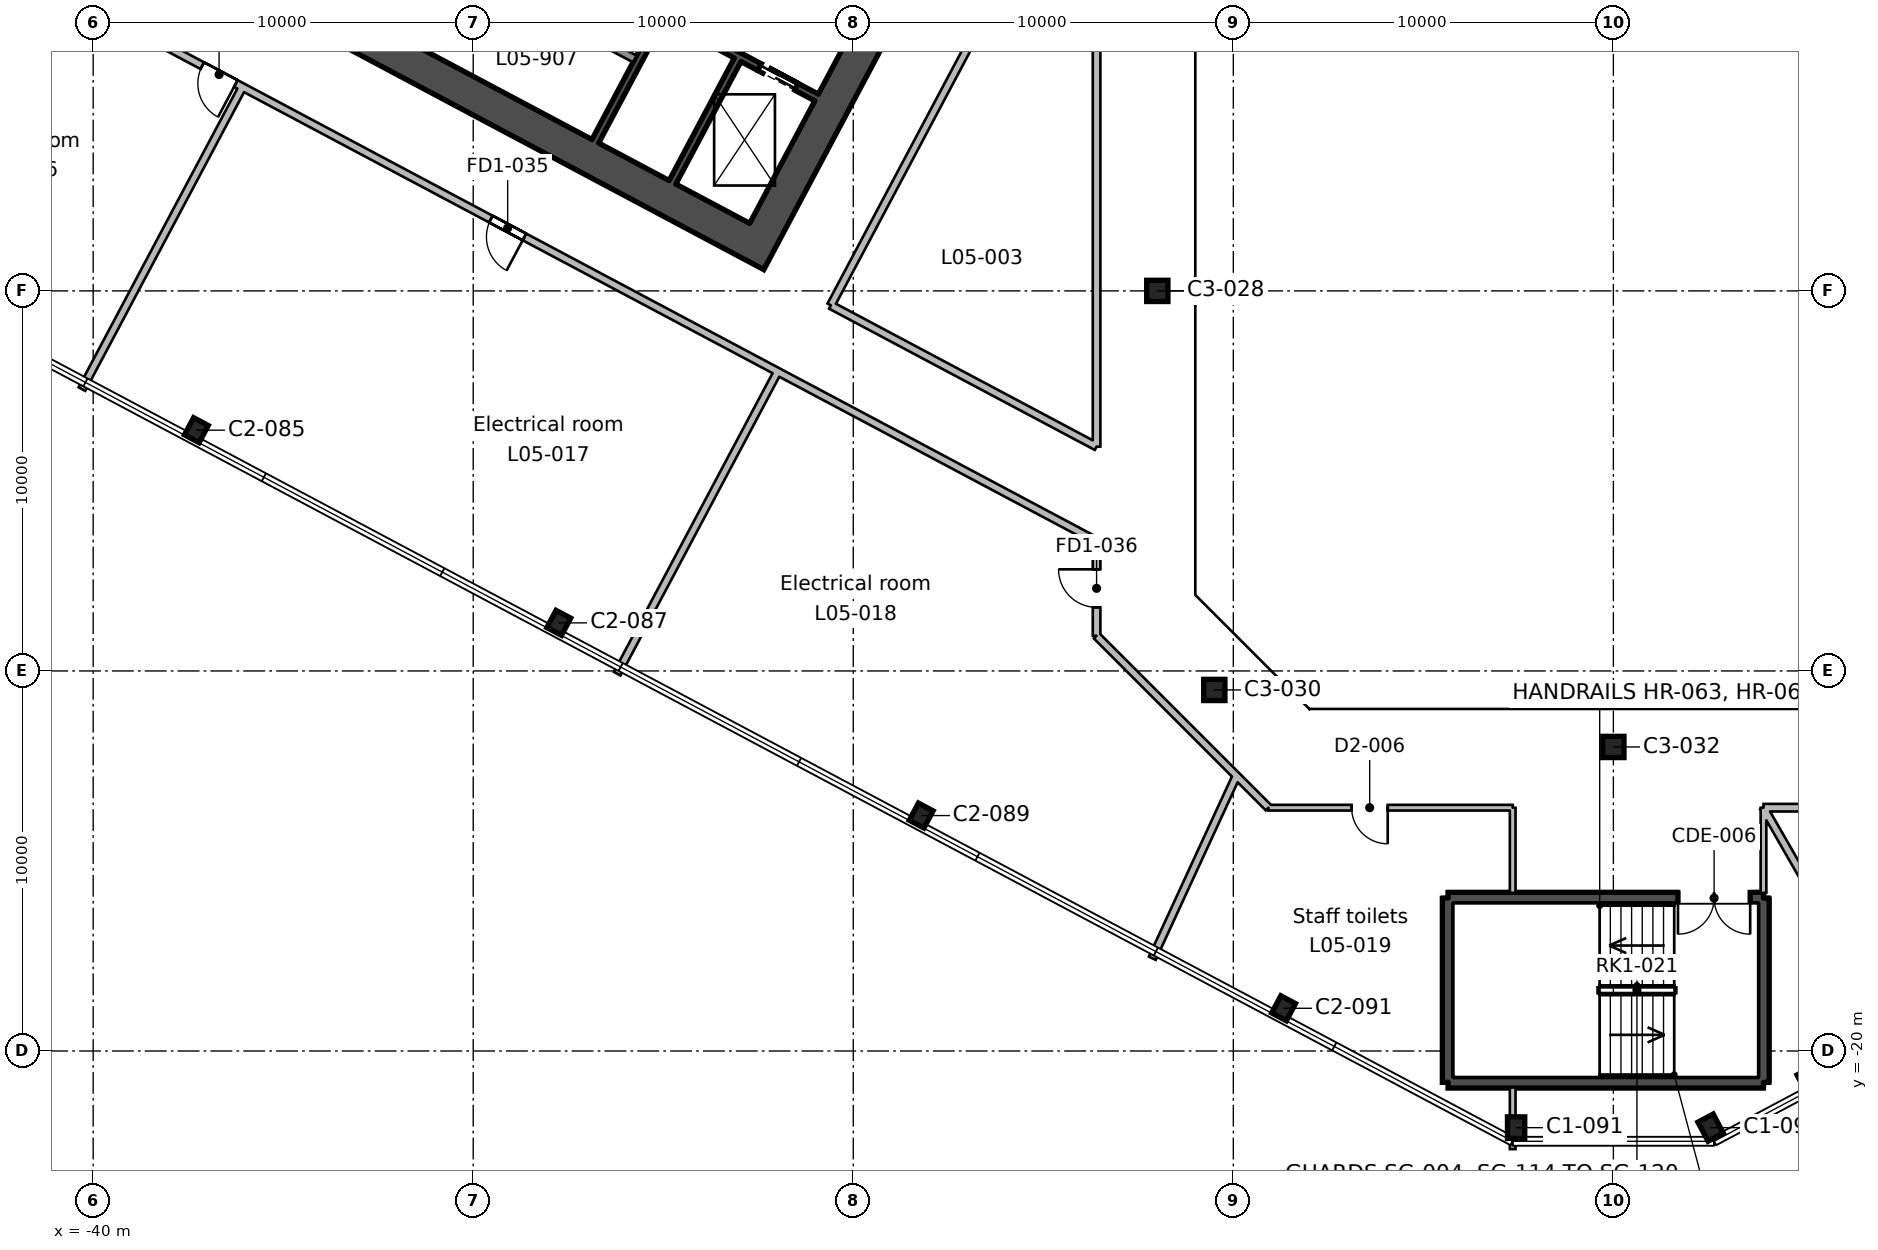
"""IFC4 building model, lengths in metres.
Left out: names, types, materials, properties, quantities, classifications, styles, units other than length and angle.
Written with IfcOpenShell. Run it as: python <this file> out.ifc"""

import sys

from ifc_helpers import new_model, si_unit, direction, frame, frame_2d, origin, origin_2d, place, context, subcontext, project, spatial, rectangle, hollow_rectangle, i_section, extrude, element, fill, save


model = new_model("IFC4")
c1 = context("Model", 3, precision=1e-05, world=origin(), true_north=direction((0.0, 1.0)))
c2 = subcontext(c1, "Body", "Model", "MODEL_VIEW")
j1 = project(units=[si_unit("LENGTHUNIT", "METRE"), si_unit("PLANEANGLEUNIT", "RADIAN")], contexts=[c1])
p1 = place(None, origin())
s1 = spatial("IfcSite", under=j1, at=p1, CompositionType="ELEMENT")
p2 = place(p1, origin())
s2 = spatial("IfcBuilding", under=s1, at=p2, CompositionType="ELEMENT")
p3 = place(p2, frame((0.0, 0.0, 28.4)))
s3 = spatial("IfcBuildingStorey", under=s2, at=p3, CompositionType="ELEMENT", Elevation=28.4)
for number, where, z_axis, x_axis in (
    (1, (-2.559, -22.017, 0.0), (0.0, 0.0, 1.0), (1.0, 0.0, 0.0)),
    (2, (2.559, -22.017, 0.0), (0.0, 0.0, 1.0), (0.883, 0.469, 0.0)),
):
    element("IfcColumn", number, at=place(p3, frame(where, z_axis=z_axis, x_axis=x_axis)), inside=s3, PredefinedType="COLUMN", context=c2, shape_type="SweptSolid", body=[
        extrude(i_section(OverallWidth=0.455, OverallDepth=0.569, WebThickness=0.078, FlangeThickness=0.125, FilletRadius=0.015, at=origin_2d()), origin(), (0.0, 0.0, 1.0), 5.4),
    ])
for number, where, z_axis, x_axis in (
    (3, (5.146, -20.754, 0.0), (0.0, 0.0, 1.0), (0.883, 0.469, 0.0)),
    (4, (-8.677, -18.876, 0.0), (0.0, 0.0, 1.0), (0.883, -0.469, 0.0)),
    (5, (-18.213, -13.805, 0.0), (0.0, 0.0, 1.0), (0.883, -0.469, 0.0)),
):
    element("IfcColumn", number, at=place(p3, frame(where, z_axis=z_axis, x_axis=x_axis)), inside=s3, PredefinedType="COLUMN", context=c2, shape_type="SweptSolid", body=[
        extrude(i_section(OverallWidth=0.437, OverallDepth=0.513, WebThickness=0.061, FlangeThickness=0.097, FilletRadius=0.015, at=origin_2d()), origin(), (0.0, 0.0, 1.0), 5.4),
    ])
for number, where, z_axis, x_axis in (
    (6, (0.0, -12.0, 0.0), (0.0, 0.0, 1.0), (1.0, 0.0, 0.0)),
    (7, (-10.5, -10.5, 0.0), (0.0, 0.0, 1.0), (1.0, 0.0, 0.0)),
):
    element("IfcColumn", number, at=place(p3, frame(where, z_axis=z_axis, x_axis=x_axis)), inside=s3, PredefinedType="COLUMN", context=c2, shape_type="SweptSolid", body=[
        extrude(hollow_rectangle(XDim=0.559, YDim=0.559, WallThickness=0.024, InnerFilletRadius=0.012, OuterFilletRadius=0.035, at=origin_2d()), origin(), (0.0, 0.0, 1.0), 5.4),
    ])
for number, where, z_axis, x_axis in (
    (8, (-27.749, -8.735, 0.0), (0.0, 0.0, 1.0), (0.883, -0.469, 0.0)),
    (9, (-37.285, -3.665, 0.0), (0.0, 0.0, 1.0), (0.883, -0.469, 0.0)),
):
    element("IfcColumn", number, at=place(p3, frame(where, z_axis=z_axis, x_axis=x_axis)), inside=s3, PredefinedType="COLUMN", context=c2, shape_type="SweptSolid", body=[
        extrude(i_section(OverallWidth=0.437, OverallDepth=0.513, WebThickness=0.061, FlangeThickness=0.097, FilletRadius=0.015, at=origin_2d()), origin(), (0.0, 0.0, 1.0), 5.4),
    ])
p4 = place(p3, frame((-12.0, 0.0, 0.0), z_axis=(0.0, 0.0, 1.0), x_axis=(1.0, 0.0, 0.0)))
e10 = element("IfcColumn", 10, at=p4, inside=s3, PredefinedType="COLUMN", context=c2, shape_type="SweptSolid", body=[
    extrude(hollow_rectangle(XDim=0.559, YDim=0.559, WallThickness=0.024, InnerFilletRadius=0.012, OuterFilletRadius=0.035, at=origin_2d()), origin(), (0.0, 0.0, 1.0), 5.4),
])
p5 = place(p3, frame((-13.362, 18.43, 0.0), z_axis=(0.0, 0.0, 1.0), x_axis=(-0.46947084998, -0.882947971864, 0.0)))
e11 = element("IfcWall", 11, at=p5, inside=s3, PredefinedType="SHEAR", context=c2, shape_type="SweptSolid", body=[
    extrude(rectangle(XDim=20.0, YDim=0.9, at=frame_2d((10.0, 0.0))), origin(), (0.0, 0.0, 1.0), 5.4),
])
p6 = place(p5, frame((7.0, 0.0, 0.0)))
e12 = element("IfcOpeningElement", 12, at=p6, cuts=e11, PredefinedType="OPENING", context=c2, shape_type="SweptSolid", body=[
    extrude(rectangle(XDim=2.4, YDim=2.4, at=frame_2d((1.2, 1.2))), frame((0.0, 0.46, 0.0), z_axis=(0.0, -1.0, 0.0), x_axis=(1.0, 0.0, 0.0)), (0.0, 0.0, 1.0), 0.92),
])
p7 = place(p3, frame((-22.937, 1.38, 0.0), z_axis=(0.0, 0.0, 1.0), x_axis=(-0.88295276571, 0.46946183394, 0.0)))
e13 = element("IfcWall", 13, at=p7, inside=s3, PredefinedType="SHEAR", context=c2, shape_type="SweptSolid", body=[
    extrude(rectangle(XDim=20.2, YDim=0.9, at=frame_2d((10.1, 0.0))), origin(), (0.0, 0.0, 1.0), 5.4),
])
p8 = place(p3, frame((-23.043, 6.08, 0.0), z_axis=(0.0, 0.0, 1.0), x_axis=(-0.469494272526, -0.882935517501, 0.0)))
e14 = element("IfcWall", 14, at=p8, inside=s3, PredefinedType="SHEAR", context=c2, shape_type="SweptSolid", body=[
    extrude(rectangle(XDim=3.65, YDim=0.2, at=frame_2d((1.825, 0.0))), origin(), (0.0, 0.0, 1.0), 5.4),
])
p9 = place(p3, frame((-23.36, 10.382, 0.0), z_axis=(0.0, 0.0, 1.0), x_axis=(-0.469480409012, -0.88294288918, 0.0)))
e15 = element("IfcWall", 15, at=p9, inside=s3, PredefinedType="SHEAR", context=c2, shape_type="SweptSolid", body=[
    extrude(rectangle(XDim=7.3, YDim=0.2, at=frame_2d((3.65, 0.0))), origin(), (0.0, 0.0, 1.0), 5.4),
])
p10 = place(p3, frame((-20.965, 5.088, 0.0), z_axis=(0.0, 0.0, 1.0), x_axis=(-0.882925986334, 0.469512196493, 0.0)))
e16 = element("IfcWall", 16, at=p10, inside=s3, PredefinedType="SHEAR", context=c2, shape_type="SweptSolid", body=[
    extrude(rectangle(XDim=4.5, YDim=0.2, at=frame_2d((2.25, 0.0))), origin(), (0.0, 0.0, 1.0), 5.4),
])
p11 = place(p10, frame((0.6, 0.0, 0.0)))
e17 = element("IfcOpeningElement", 17, at=p11, cuts=e16, PredefinedType="OPENING", context=c2, shape_type="SweptSolid", body=[
    extrude(rectangle(XDim=1.1, YDim=2.1, at=frame_2d((0.55, 1.05))), frame((0.0, 0.11, 0.0), z_axis=(0.0, -1.0, 0.0), x_axis=(1.0, 0.0, 0.0)), (0.0, 0.0, 1.0), 0.22),
])
p12 = place(p3, frame((-25.749, 6.103, 0.0), z_axis=(0.0, 0.0, 1.0), x_axis=(-0.882953967957, 0.469459572775, 0.0)))
e18 = element("IfcWall", 18, at=p12, inside=s3, PredefinedType="SOLIDWALL", context=c2, shape_type="SweptSolid", body=[
    extrude(rectangle(XDim=5.2, YDim=0.2, at=frame_2d((2.6, 0.0))), origin(), (0.0, 0.0, 1.0), 5.4),
])
p13 = place(p3, frame((3.95, -15.975, 0.0), z_axis=(0.0, 0.0, 1.0), x_axis=(0.0, -1.0, 0.0)))
e19 = element("IfcWall", 19, at=p13, inside=s3, PredefinedType="SHEAR", context=c2, shape_type="SweptSolid", body=[
    extrude(rectangle(XDim=4.85, YDim=0.3, at=frame_2d((2.425, 0.0))), origin(), (0.0, 0.0, 1.0), 5.4),
])
p14 = place(p3, frame((3.95, -20.825, 0.0), z_axis=(0.0, 0.0, 1.0), x_axis=(-1.0, 0.0, 0.0)))
e20 = element("IfcWall", 20, at=p14, inside=s3, PredefinedType="SHEAR", context=c2, shape_type="SweptSolid", body=[
    extrude(rectangle(XDim=8.3, YDim=0.3, at=frame_2d((4.15, 0.0))), origin(), (0.0, 0.0, 1.0), 5.4),
])
p15 = place(p3, frame((-4.35, -20.825, 0.0), z_axis=(0.0, 0.0, 1.0), x_axis=(0.0, 1.0, 0.0)))
e21 = element("IfcWall", 21, at=p15, inside=s3, PredefinedType="SHEAR", context=c2, shape_type="SweptSolid", body=[
    extrude(rectangle(XDim=4.85, YDim=0.3, at=frame_2d((2.425, 0.0))), origin(), (0.0, 0.0, 1.0), 5.4),
])
p16 = place(p3, frame((-4.35, -15.975, 0.0), z_axis=(0.0, 0.0, 1.0), x_axis=(1.0, 0.0, 0.0)))
e22 = element("IfcWall", 22, at=p16, inside=s3, PredefinedType="SHEAR", context=c2, shape_type="SweptSolid", body=[
    extrude(rectangle(XDim=8.3, YDim=0.3, at=frame_2d((4.15, 0.0))), origin(), (0.0, 0.0, 1.0), 5.4),
])
p17 = place(p16, frame((6.05, 0.0, 0.0)))
e23 = element("IfcOpeningElement", 23, at=p17, cuts=e22, PredefinedType="OPENING", context=c2, shape_type="SweptSolid", body=[
    extrude(rectangle(XDim=1.9, YDim=2.1, at=frame_2d((0.95, 1.05))), frame((0.0, 0.16, 0.0), z_axis=(0.0, -1.0, 0.0), x_axis=(1.0, 0.0, 0.0)), (0.0, 0.0, 1.0), 0.32),
])
p18 = place(p3, frame((-36.071, 5.364, 0.0), z_axis=(0.0, 0.0, 1.0), x_axis=(-0.469475779988, -0.88294535052, 0.0)))
e24 = element("IfcWall", 24, at=p18, inside=s3, PredefinedType="PARTITIONING", context=c2, shape_type="SweptSolid", body=[
    extrude(rectangle(XDim=9.002, YDim=0.2, at=frame_2d((4.501, 0.0))), origin(), (0.0, 0.0, 1.0), 4.95),
])
p19 = place(p3, frame((-13.598, -6.585, 0.0), z_axis=(0.0, 0.0, 1.0), x_axis=(-0.882949042681, 0.469468836057, 0.0)))
e25 = element("IfcWall", 25, at=p19, inside=s3, PredefinedType="PARTITIONING", context=c2, shape_type="SweptSolid", body=[
    extrude(rectangle(XDim=35.059, YDim=0.2, at=frame_2d((17.529, 0.0))), origin(), (0.0, 0.0, 1.0), 4.95),
])
p20 = place(p19, frame((25.65, 0.0, 0.0)))
e26 = element("IfcOpeningElement", 26, at=p20, cuts=e25, PredefinedType="OPENING", context=c2, shape_type="SweptSolid", body=[
    extrude(rectangle(XDim=1.0, YDim=2.1, at=frame_2d((0.5, 1.05))), frame((0.0, 0.11, 0.0), z_axis=(0.0, -1.0, 0.0), x_axis=(1.0, 0.0, 0.0)), (0.0, 0.0, 1.0), 0.22),
])
p21 = place(p19, frame((17.05, 0.0, 0.0)))
e27 = element("IfcOpeningElement", 27, at=p21, cuts=e25, PredefinedType="OPENING", context=c2, shape_type="SweptSolid", body=[
    extrude(rectangle(XDim=1.0, YDim=2.1, at=frame_2d((0.5, 1.05))), frame((0.0, 0.11, 0.0), z_axis=(0.0, -1.0, 0.0), x_axis=(1.0, 0.0, 0.0)), (0.0, 0.0, 1.0), 0.22),
])
p22 = place(p3, frame((-21.988, -2.124, 0.0), z_axis=(0.0, 0.0, 1.0), x_axis=(-0.469475779988, -0.88294535052, 0.0)))
e28 = element("IfcWall", 28, at=p22, inside=s3, PredefinedType="PARTITIONING", context=c2, shape_type="SweptSolid", body=[
    extrude(rectangle(XDim=9.002, YDim=0.2, at=frame_2d((4.501, 0.0))), origin(), (0.0, 0.0, 1.0), 4.95),
])
p23 = place(p3, frame((-9.917, -12.757, 0.0), z_axis=(0.0, 0.0, 1.0), x_axis=(-0.707083331725, 0.70713022987, 0.0)))
e29 = element("IfcWall", 29, at=p23, inside=s3, PredefinedType="PARTITIONING", context=c2, shape_type="SweptSolid", body=[
    extrude(rectangle(XDim=5.206, YDim=0.2, at=frame_2d((2.603, 0.0))), origin(), (0.0, 0.0, 1.0), 4.95),
])
p24 = place(p3, frame((-13.598, -9.076, 0.0), z_axis=(0.0, 0.0, 1.0), x_axis=(0.0, 1.0, 0.0)))
e30 = element("IfcWall", 30, at=p24, inside=s3, PredefinedType="PARTITIONING", context=c2, shape_type="SweptSolid", body=[
    extrude(rectangle(XDim=2.474, YDim=0.2, at=frame_2d((1.237, 0.0))), origin(), (0.0, 0.0, 1.0), 4.95),
])
p25 = place(p24, frame((0.75, 0.0, 0.0)))
e31 = element("IfcOpeningElement", 31, at=p25, cuts=e30, PredefinedType="OPENING", context=c2, shape_type="SweptSolid", body=[
    extrude(rectangle(XDim=1.0, YDim=2.1, at=frame_2d((0.5, 1.05))), frame((0.0, 0.11, 0.0), z_axis=(0.0, -1.0, 0.0), x_axis=(1.0, 0.0, 0.0)), (0.0, 0.0, 1.0), 0.22),
])
p26 = place(p3, frame((-9.917, -12.757, 0.0), z_axis=(0.0, 0.0, 1.0), x_axis=(-0.418797645162, -0.908079584842, 0.0)))
e32 = element("IfcWall", 32, at=p26, inside=s3, PredefinedType="PARTITIONING", context=c2, shape_type="SweptSolid", body=[
    extrude(rectangle(XDim=5.289, YDim=0.2, at=frame_2d((2.645, 0.0))), origin(), (0.0, 0.0, 1.0), 4.95),
])
p27 = place(p3, frame((-3.887, -13.598, 0.0), z_axis=(0.0, 0.0, 1.0), x_axis=(-1.0, 0.0, 0.0)))
e33 = element("IfcWall", 33, at=p27, inside=s3, PredefinedType="PARTITIONING", context=c2, shape_type="SweptSolid", body=[
    extrude(rectangle(XDim=5.189, YDim=0.15, at=frame_2d((2.594, 0.0))), origin(), (0.0, 0.0, 1.0), 4.95),
])
p28 = place(p27, frame((2.05, 0.0, 0.0)))
e34 = element("IfcOpeningElement", 34, at=p28, cuts=e33, PredefinedType="OPENING", context=c2, shape_type="SweptSolid", body=[
    extrude(rectangle(XDim=0.95, YDim=2.1, at=frame_2d((0.475, 1.05))), frame((0.0, 0.085, 0.0), z_axis=(0.0, -1.0, 0.0), x_axis=(1.0, 0.0, 0.0)), (0.0, 0.0, 1.0), 0.17),
])
p29 = place(p3, frame((-9.076, -13.598, 0.0), z_axis=(0.0, 0.0, 1.0), x_axis=(-0.707209416613, 0.707004130861, 0.0)))
e35 = element("IfcWall", 35, at=p29, inside=s3, PredefinedType="PARTITIONING", context=c2, shape_type="SweptSolid", body=[
    extrude(rectangle(XDim=1.189, YDim=0.2, at=frame_2d((0.595, 0.0))), origin(), (0.0, 0.0, 1.0), 4.95),
])
p30 = place(p3, frame((-2.649, -15.84, 0.0), z_axis=(0.0, 0.0, 1.0), x_axis=(0.0, 1.0, 0.0)))
e36 = element("IfcWall", 36, at=p30, inside=s3, PredefinedType="PARTITIONING", context=c2, shape_type="SweptSolid", body=[
    extrude(rectangle(XDim=2.242, YDim=0.15, at=frame_2d((1.121, 0.0))), origin(), (0.0, 0.0, 1.0), 4.95),
])
p31 = place(p3, frame((-2.649, -13.598, 0.0), z_axis=(0.0, 0.0, 1.0), x_axis=(-1.0, 0.0, 0.0)))
e37 = element("IfcWall", 37, at=p31, inside=s3, PredefinedType="PARTITIONING", context=c2, shape_type="SweptSolid", body=[
    extrude(rectangle(XDim=1.238, YDim=0.15, at=frame_2d((0.619, 0.0))), origin(), (0.0, 0.0, 1.0), 4.95),
])
p32 = place(p3, frame((-2.649, -20.96, 0.0), z_axis=(0.0, 0.0, 1.0), x_axis=(0.0, -1.0, 0.0)))
e38 = element("IfcWall", 38, at=p32, inside=s3, PredefinedType="PARTITIONING", context=c2, shape_type="SweptSolid", body=[
    extrude(rectangle(XDim=1.622, YDim=0.15, at=frame_2d((0.811, 0.0))), origin(), (0.0, 0.0, 1.0), 4.95),
])
p33 = place(p3, frame((3.95, -13.598, 0.0), z_axis=(0.0, 0.0, 1.0), x_axis=(0.0, -1.0, 0.0)))
e39 = element("IfcWall", 39, at=p33, inside=s3, PredefinedType="PARTITIONING", context=c2, shape_type="SweptSolid", body=[
    extrude(rectangle(XDim=2.242, YDim=0.15, at=frame_2d((1.121, 0.0))), origin(), (0.0, 0.0, 1.0), 4.95),
])
p34 = place(p3, frame((9.076, -13.598, 0.0), z_axis=(0.0, 0.0, 1.0), x_axis=(-1.0, 0.0, 0.0)))
e40 = element("IfcWall", 40, at=p34, inside=s3, PredefinedType="PARTITIONING", context=c2, shape_type="SweptSolid", body=[
    extrude(rectangle(XDim=5.126, YDim=0.2, at=frame_2d((2.563, 0.0))), origin(), (0.0, 0.0, 1.0), 4.95),
])
p35 = place(p34, frame((1.95, 0.0, 0.0)))
e41 = element("IfcOpeningElement", 41, at=p35, cuts=e40, PredefinedType="OPENING", context=c2, shape_type="SweptSolid", body=[
    extrude(rectangle(XDim=1.0, YDim=2.1, at=frame_2d((0.5, 1.05))), frame((0.0, 0.11, 0.0), z_axis=(0.0, -1.0, 0.0), x_axis=(1.0, 0.0, 0.0)), (0.0, 0.0, 1.0), 0.22),
])
p36 = place(p3, frame((7.609, -19.965, 0.0), z_axis=(0.0, 0.0, 1.0), x_axis=(-0.498246245443, 0.867035569571, 0.0)))
e42 = element("IfcWall", 42, at=p36, inside=s3, PredefinedType="PARTITIONING", context=c2, shape_type="SweptSolid", body=[
    extrude(rectangle(XDim=7.344, YDim=0.2, at=frame_2d((3.672, 0.0))), origin(), (0.0, 0.0, 1.0), 4.95),
])
p37 = place(p3, frame((-20.59, -0.38, 0.0), z_axis=(0.0, 0.0, 1.0), x_axis=(0.4694565083, 0.882955597306, 0.0)))
e43 = element("IfcWall", 43, at=p37, inside=s3, PredefinedType="PARTITIONING", context=c2, shape_type="SweptSolid", body=[
    extrude(rectangle(XDim=20.004, YDim=0.2, at=frame_2d((10.002, 0.0))), origin(), (0.0, 0.0, 1.0), 4.95),
])
p38 = place(p37, frame((9.55, 0.0, 0.0)))
e44 = element("IfcOpeningElement", 44, at=p38, cuts=e43, PredefinedType="OPENING", context=c2, shape_type="SweptSolid", body=[
    extrude(rectangle(XDim=1.0, YDim=2.1, at=frame_2d((0.5, 1.05))), frame((0.0, 0.11, 0.0), z_axis=(0.0, -1.0, 0.0), x_axis=(1.0, 0.0, 0.0)), (0.0, 0.0, 1.0), 0.22),
])
p39 = place(p3, frame((-13.598, 9.076, 0.0), z_axis=(0.0, 0.0, 1.0), x_axis=(0.0, -1.0, 0.0)))
e45 = element("IfcWall", 45, at=p39, inside=s3, PredefinedType="PARTITIONING", context=c2, shape_type="SweptSolid", body=[
    extrude(rectangle(XDim=13.174, YDim=0.2, at=frame_2d((6.587, 0.0))), origin(), (0.0, 0.0, 1.0), 4.95),
])
p40 = place(p3, frame((-13.598, -4.098, 0.0), z_axis=(0.0, 0.0, 1.0), x_axis=(-0.88293683418, 0.469491796359, 0.0)))
e46 = element("IfcWall", 46, at=p40, inside=s3, PredefinedType="PARTITIONING", context=c2, shape_type="SweptSolid", body=[
    extrude(rectangle(XDim=7.919, YDim=0.2, at=frame_2d((3.959, 0.0))), origin(), (0.0, 0.0, 1.0), 4.95),
])
p41 = place(p11, origin())
e47 = element("IfcDoor", 47, at=p41, inside=s3, OperationType="DOUBLE_DOOR_SLIDING", PredefinedType="DOOR", context=c2, shape_type="SweptSolid", body=[
    extrude(rectangle(XDim=1.1, YDim=2.1, at=frame_2d((0.55, 1.05))), frame((0.0, 0.025, 0.0), z_axis=(0.0, -1.0, 0.0), x_axis=(1.0, 0.0, 0.0)), (0.0, 0.0, 1.0), 0.05),
])
fill(e17, e47)
p42 = place(p17, frame((1.9, 0.0, 0.0), z_axis=(0.0, 0.0, 1.0), x_axis=(-1.0, 0.0, 0.0)))
e48 = element("IfcDoor", 48, at=p42, inside=s3, OperationType="DOUBLE_DOOR_SINGLE_SWING", PredefinedType="DOOR", context=c2, shape_type="SweptSolid", body=[
    extrude(rectangle(XDim=1.9, YDim=2.1, at=frame_2d((0.95, 1.05))), frame((0.0, 0.025, 0.0), z_axis=(0.0, -1.0, 0.0), x_axis=(1.0, 0.0, 0.0)), (0.0, 0.0, 1.0), 0.05),
])
fill(e23, e48)
p43 = place(p20, origin())
e49 = element("IfcDoor", 49, at=p43, inside=s3, OperationType="SINGLE_SWING_LEFT", PredefinedType="DOOR", context=c2, shape_type="SweptSolid", body=[
    extrude(rectangle(XDim=1.0, YDim=2.1, at=frame_2d((0.5, 1.05))), frame((0.0, 0.025, 0.0), z_axis=(0.0, -1.0, 0.0), x_axis=(1.0, 0.0, 0.0)), (0.0, 0.0, 1.0), 0.05),
])
fill(e26, e49)
p44 = place(p21, origin())
e50 = element("IfcDoor", 50, at=p44, inside=s3, OperationType="SINGLE_SWING_LEFT", PredefinedType="DOOR", context=c2, shape_type="SweptSolid", body=[
    extrude(rectangle(XDim=1.0, YDim=2.1, at=frame_2d((0.5, 1.05))), frame((0.0, 0.025, 0.0), z_axis=(0.0, -1.0, 0.0), x_axis=(1.0, 0.0, 0.0)), (0.0, 0.0, 1.0), 0.05),
])
fill(e27, e50)
p45 = place(p25, origin())
e51 = element("IfcDoor", 51, at=p45, inside=s3, OperationType="SINGLE_SWING_RIGHT", PredefinedType="DOOR", context=c2, shape_type="SweptSolid", body=[
    extrude(rectangle(XDim=1.0, YDim=2.1, at=frame_2d((0.5, 1.05))), frame((0.0, 0.025, 0.0), z_axis=(0.0, -1.0, 0.0), x_axis=(1.0, 0.0, 0.0)), (0.0, 0.0, 1.0), 0.05),
])
fill(e31, e51)
p46 = place(p28, origin())
e52 = element("IfcDoor", 52, at=p46, inside=s3, OperationType="SINGLE_SWING_LEFT", PredefinedType="DOOR", context=c2, shape_type="SweptSolid", body=[
    extrude(rectangle(XDim=0.95, YDim=2.1, at=frame_2d((0.475, 1.05))), frame((0.0, 0.025, 0.0), z_axis=(0.0, -1.0, 0.0), x_axis=(1.0, 0.0, 0.0)), (0.0, 0.0, 1.0), 0.05),
])
fill(e34, e52)
save(model, sys.argv[1])
